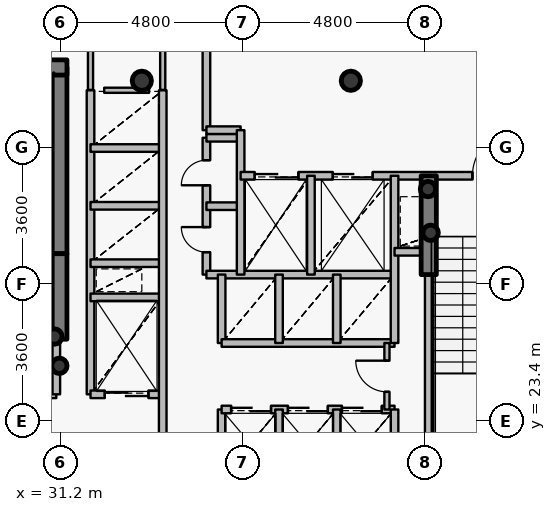
"""IFC4 building model, lengths in metres.
Left out: names, types, materials, properties, quantities, classifications, styles, units other than length and angle.
Written with IfcOpenShell. Run it as: python <this file> out.ifc"""

import sys

from ifc_helpers import new_model, si_unit, direction, frame, frame_2d, origin, origin_2d, place, context, subcontext, project, spatial, rectangle, hollow_circle, extrude, source, transform, mapped, element, fill, save


model = new_model("IFC4")
c1 = context("Model", 3, precision=1e-05, world=origin(), true_north=direction((0.0, 1.0)))
c2 = subcontext(c1, "Body", "Model", "MODEL_VIEW")
j1 = project(units=[si_unit("LENGTHUNIT", "METRE"), si_unit("PLANEANGLEUNIT", "RADIAN")], contexts=[c1])
p1 = place(None, origin())
s1 = spatial("IfcSite", under=j1, at=p1, CompositionType="ELEMENT")
p2 = place(p1, origin())
s2 = spatial("IfcBuilding", under=s1, at=p2, CompositionType="ELEMENT")
p3 = place(p2, frame((0.0, 0.0, 138.45)))
s3 = spatial("IfcBuildingStorey", under=s2, at=p3, CompositionType="ELEMENT", Elevation=138.45)
for number, where, z_axis, x_axis in (
    (1, (38.85, 32.35, 0.0), (0.0, 0.0, 1.0), (1.0, 0.0, 0.0)),
    (2, (33.35, 32.35, 0.0), (0.0, 0.0, 1.0), (1.0, 0.0, 0.0)),
):
    element("IfcColumn", number, at=place(p3, frame(where, z_axis=z_axis, x_axis=x_axis)), inside=s3, PredefinedType="COLUMN", context=c2, shape_type="SweptSolid", body=[
        extrude(hollow_circle(Radius=0.254, WallThickness=0.02, at=origin_2d()), origin(), (0.0, 0.0, 1.0), 3.75),
    ])
p4 = place(p3, frame((31.18, 27.8, 0.0), z_axis=(0.0, 0.0, 1.0), x_axis=(0.0, 1.0, 0.0)))
e3 = element("IfcWall", 3, at=p4, inside=s3, PredefinedType="SHEAR", context=c2, shape_type="SweptSolid", body=[
    extrude(rectangle(XDim=4.9, YDim=0.4, at=frame_2d((2.45, 0.0))), origin(), (0.0, 0.0, 1.0), 3.75),
])
p5 = place(p3, frame((27.28, 32.7, 0.0), z_axis=(0.0, 0.0, 1.0), x_axis=(1.0, 0.0, 0.0)))
e4 = element("IfcWall", 4, at=p5, inside=s3, PredefinedType="SHEAR", context=c2, shape_type="SweptSolid", body=[
    extrude(rectangle(XDim=4.1, YDim=0.4, at=frame_2d((2.05, 0.0))), origin(), (0.0, 0.0, 1.0), 3.75),
])
for number, where, z_axis, x_axis in (
    (5, (31.05, 25.62, 0.0), (0.0, 0.0, 1.0), (1.0, 0.0, 0.0)),
    (6, (31.18, 24.85, 0.0), (0.0, 0.0, 1.0), (1.0, 0.0, 0.0)),
    (7, (40.95, 28.35, 0.0), (0.0, 0.0, 1.0), (1.0, 0.0, 0.0)),
    (8, (40.88, 29.5, 0.0), (0.0, 0.0, 1.0), (1.0, 0.0, 0.0)),
):
    element("IfcColumn", number, at=place(p3, frame(where, z_axis=z_axis, x_axis=x_axis)), inside=s3, PredefinedType="COLUMN", context=c2, shape_type="SweptSolid", body=[
        extrude(hollow_circle(Radius=0.203, WallThickness=0.016, at=origin_2d()), origin(), (0.0, 0.0, 1.0), 3.75),
    ])
p6 = place(p3, frame((31.18, 25.55, 0.0), z_axis=(0.0, 0.0, 1.0), x_axis=(0.0, 1.0, 0.0)))
e9 = element("IfcWall", 9, at=p6, inside=s3, PredefinedType="SHEAR", context=c2, shape_type="SweptSolid", body=[
    extrude(rectangle(XDim=2.25, YDim=0.4, at=frame_2d((1.125, 0.0))), origin(), (0.0, 0.0, 1.0), 3.1),
])
p7 = place(p3, frame((40.9, 27.25, 0.0), z_axis=(0.0, 0.0, 1.0), x_axis=(0.0, 1.0, 0.0)))
e10 = element("IfcWall", 10, at=p7, inside=s3, PredefinedType="SHEAR", context=c2, shape_type="SweptSolid", body=[
    extrude(rectangle(XDim=2.6, YDim=0.4, at=frame_2d((1.3, 0.0))), origin(), (0.0, 0.0, 1.0), 3.1),
])
p8 = place(p3, frame((27.56, 24.1, 0.0), z_axis=(0.0, 0.0, 1.0), x_axis=(1.0, 0.0, 0.0)))
e11 = element("IfcWall", 11, at=p8, inside=s3, PredefinedType="PARTITIONING", context=c2, shape_type="SweptSolid", body=[
    extrude(rectangle(XDim=3.54, YDim=0.2, at=frame_2d((1.77, 0.0))), origin(), (0.0, 0.0, 1.0), 3.5),
])
p9 = place(p8, frame((1.17, 0.0, 0.0)))
e12 = element("IfcOpeningElement", 12, at=p9, cuts=e11, PredefinedType="OPENING", context=c2, shape_type="SweptSolid", body=[
    extrude(rectangle(XDim=1.2, YDim=2.15, at=origin_2d()), frame((0.6, 0.11, 1.075), z_axis=(0.0, -1.0, 0.0), x_axis=(1.0, 0.0, 0.0)), (0.0, 0.0, 1.0), 0.22),
])
p10 = place(p3, frame((31.1, 24.1, 0.0), z_axis=(0.0, 0.0, 1.0), x_axis=(0.0, 1.0, 0.0)))
e13 = element("IfcWall", 13, at=p10, inside=s3, PredefinedType="PARTITIONING", context=c2, shape_type="SweptSolid", body=[
    extrude(rectangle(XDim=1.44, YDim=0.2, at=frame_2d((0.72, 0.0))), origin(), (0.0, 0.0, 1.0), 3.5),
])
p11 = place(p3, frame((32.0, 24.1, 0.0), z_axis=(0.0, 0.0, 1.0), x_axis=(0.0, 1.0, 0.0)))
e14 = element("IfcWall", 14, at=p11, inside=s3, PredefinedType="PARTITIONING", context=c2, shape_type="SweptSolid", body=[
    extrude(rectangle(XDim=8.0, YDim=0.2, at=frame_2d((4.0, 0.0))), origin(), (0.0, 0.0, 1.0), 3.5),
])
p12 = place(p3, frame((32.0, 24.1, 0.0), z_axis=(0.0, 0.0, 1.0), x_axis=(1.0, 0.0, 0.0)))
e15 = element("IfcWall", 15, at=p12, inside=s3, PredefinedType="PARTITIONING", context=c2, shape_type="SweptSolid", body=[
    extrude(rectangle(XDim=1.9, YDim=0.2, at=frame_2d((0.95, 0.0))), origin(), (0.0, 0.0, 1.0), 3.085),
])
p13 = place(p12, frame((0.375, 0.0, 0.0)))
e16 = element("IfcOpeningElement", 16, at=p13, cuts=e15, PredefinedType="OPENING", context=c2, shape_type="SweptSolid", body=[
    extrude(rectangle(XDim=1.15, YDim=2.15, at=origin_2d()), frame((0.575, 0.11, 1.075), z_axis=(0.0, -1.0, 0.0), x_axis=(1.0, 0.0, 0.0)), (0.0, 0.0, 1.0), 0.22),
])
for number, where, z_axis, x_axis in (
    (17, (32.0, 26.65, 0.0), (0.0, 0.0, 1.0), (1.0, 0.0, 0.0)),
    (18, (32.0, 27.55, 0.0), (0.0, 0.0, 1.0), (1.0, 0.0, 0.0)),
    (19, (32.0, 29.06, 0.0), (0.0, 0.0, 1.0), (1.0, 0.0, 0.0)),
    (20, (32.0, 30.58, 0.0), (0.0, 0.0, 1.0), (1.0, 0.0, 0.0)),
):
    element("IfcWall", number, at=place(p3, frame(where, z_axis=z_axis, x_axis=x_axis)), inside=s3, PredefinedType="PARTITIONING", context=c2, shape_type="SweptSolid", body=[
        extrude(rectangle(XDim=1.9, YDim=0.2, at=frame_2d((0.95, 0.0))), origin(), (0.0, 0.0, 1.0), 3.085),
    ])
p14 = place(p3, frame((33.9, 20.6, 0.0), z_axis=(0.0, 0.0, 1.0), x_axis=(0.0, 1.0, 0.0)))
e21 = element("IfcWall", 21, at=p14, inside=s3, PredefinedType="PARTITIONING", context=c2, shape_type="SweptSolid", body=[
    extrude(rectangle(XDim=11.5, YDim=0.2, at=frame_2d((5.75, 0.0))), origin(), (0.0, 0.0, 1.0), 3.085),
])
p15 = place(p3, frame((35.05, 27.25, 0.0), z_axis=(0.0, 0.0, 1.0), x_axis=(0.0, 1.0, 0.0)))
e22 = element("IfcWall", 22, at=p15, inside=s3, PredefinedType="PARTITIONING", context=c2, shape_type="SweptSolid", body=[
    extrude(rectangle(XDim=3.6, YDim=0.2, at=frame_2d((1.8, 0.0))), origin(), (0.0, 0.0, 1.0), 3.5),
])
p16 = place(p15, frame((0.59, 0.0, 0.0)))
e23 = element("IfcOpeningElement", 23, at=p16, cuts=e22, PredefinedType="OPENING", context=c2, shape_type="SweptSolid", body=[
    extrude(rectangle(XDim=0.66, YDim=2.05, at=origin_2d()), frame((0.33, 0.11, 1.025), z_axis=(0.0, -1.0, 0.0), x_axis=(1.0, 0.0, 0.0)), (0.0, 0.0, 1.0), 0.22),
])
p17 = place(p15, frame((2.35, 0.0, 0.0)))
e24 = element("IfcOpeningElement", 24, at=p17, cuts=e22, PredefinedType="OPENING", context=c2, shape_type="SweptSolid", body=[
    extrude(rectangle(XDim=0.66, YDim=2.05, at=origin_2d()), frame((0.33, 0.11, 1.025), z_axis=(0.0, -1.0, 0.0), x_axis=(1.0, 0.0, 0.0)), (0.0, 0.0, 1.0), 0.22),
])
p18 = place(p3, frame((35.05, 27.25, 0.0), z_axis=(0.0, 0.0, 1.0), x_axis=(1.0, 0.0, 0.0)))
e25 = element("IfcWall", 25, at=p18, inside=s3, PredefinedType="PARTITIONING", context=c2, shape_type="SweptSolid", body=[
    extrude(rectangle(XDim=4.95, YDim=0.2, at=frame_2d((2.475, 0.0))), origin(), (0.0, 0.0, 1.0), 3.085),
])
for number, where, z_axis, x_axis in (
    (26, (35.05, 29.05, 0.0), (0.0, 0.0, 1.0), (1.0, 0.0, 0.0)),
    (27, (35.05, 30.85, 0.0), (0.0, 0.0, 1.0), (1.0, 0.0, 0.0)),
):
    element("IfcWall", number, at=place(p3, frame(where, z_axis=z_axis, x_axis=x_axis)), inside=s3, PredefinedType="PARTITIONING", context=c2, shape_type="SweptSolid", body=[
        extrude(rectangle(XDim=0.9, YDim=0.2, at=frame_2d((0.45, 0.0))), origin(), (0.0, 0.0, 1.0), 3.5),
    ])
p19 = place(p3, frame((35.05, 31.05, 0.0), z_axis=(0.0, 0.0, 1.0), x_axis=(0.0, 1.0, 0.0)))
e28 = element("IfcWall", 28, at=p19, inside=s3, PredefinedType="PARTITIONING", context=c2, shape_type="SweptSolid", body=[
    extrude(rectangle(XDim=2.35, YDim=0.2, at=frame_2d((1.175, 0.0))), origin(), (0.0, 0.0, 1.0), 3.085),
])
p20 = place(p3, frame((35.05, 31.05, 0.0), z_axis=(0.0, 0.0, 1.0), x_axis=(1.0, 0.0, 0.0)))
e29 = element("IfcWall", 29, at=p20, inside=s3, PredefinedType="PARTITIONING", context=c2, shape_type="SweptSolid", body=[
    extrude(rectangle(XDim=0.9, YDim=0.2, at=frame_2d((0.45, 0.0))), origin(), (0.0, 0.0, 1.0), 3.5),
])
p21 = place(p3, frame((35.45, 21.9, 0.0), z_axis=(0.0, 0.0, 1.0), x_axis=(0.0, 1.0, 0.0)))
e30 = element("IfcWall", 30, at=p21, inside=s3, PredefinedType="PARTITIONING", context=c2, shape_type="SweptSolid", body=[
    extrude(rectangle(XDim=1.8, YDim=0.2, at=frame_2d((0.9, 0.0))), origin(), (0.0, 0.0, 1.0), 3.5),
])
p22 = place(p3, frame((35.45, 23.7, 0.0), z_axis=(0.0, 0.0, 1.0), x_axis=(1.0, 0.0, 0.0)))
e31 = element("IfcWall", 31, at=p22, inside=s3, PredefinedType="PARTITIONING", context=c2, shape_type="SweptSolid", body=[
    extrude(rectangle(XDim=4.55, YDim=0.2, at=frame_2d((2.275, 0.0))), origin(), (0.0, 0.0, 1.0), 3.085),
])
p23 = place(p22, frame((0.25, 0.0, 0.0)))
e32 = element("IfcOpeningElement", 32, at=p23, cuts=e31, PredefinedType="OPENING", context=c2, shape_type="SweptSolid", body=[
    extrude(rectangle(XDim=1.05, YDim=2.15, at=origin_2d()), frame((0.525, 0.11, 1.075), z_axis=(0.0, -1.0, 0.0), x_axis=(1.0, 0.0, 0.0)), (0.0, 0.0, 1.0), 0.22),
])
p24 = place(p22, frame((1.745, 0.0, 0.0)))
e33 = element("IfcOpeningElement", 33, at=p24, cuts=e31, PredefinedType="OPENING", context=c2, shape_type="SweptSolid", body=[
    extrude(rectangle(XDim=1.05, YDim=2.15, at=origin_2d()), frame((0.525, 0.11, 1.075), z_axis=(0.0, -1.0, 0.0), x_axis=(1.0, 0.0, 0.0)), (0.0, 0.0, 1.0), 0.22),
])
p25 = place(p22, frame((3.165, 0.0, 0.0)))
e34 = element("IfcOpeningElement", 34, at=p25, cuts=e31, PredefinedType="OPENING", context=c2, shape_type="SweptSolid", body=[
    extrude(rectangle(XDim=1.05, YDim=2.15, at=origin_2d()), frame((0.525, 0.11, 1.075), z_axis=(0.0, -1.0, 0.0), x_axis=(1.0, 0.0, 0.0)), (0.0, 0.0, 1.0), 0.22),
])
p26 = place(p3, frame((35.45, 25.45, 0.0), z_axis=(0.0, 0.0, 1.0), x_axis=(0.0, 1.0, 0.0)))
e35 = element("IfcWall", 35, at=p26, inside=s3, PredefinedType="PARTITIONING", context=c2, shape_type="SweptSolid", body=[
    extrude(rectangle(XDim=1.8, YDim=0.2, at=frame_2d((0.9, 0.0))), origin(), (0.0, 0.0, 1.0), 3.5),
])
p27 = place(p3, frame((35.45, 25.45, 0.0), z_axis=(0.0, 0.0, 1.0), x_axis=(1.0, 0.0, 0.0)))
e36 = element("IfcWall", 36, at=p27, inside=s3, PredefinedType="PARTITIONING", context=c2, shape_type="SweptSolid", body=[
    extrude(rectangle(XDim=4.55, YDim=0.2, at=frame_2d((2.275, 0.0))), origin(), (0.0, 0.0, 1.0), 3.085),
])
p28 = place(p3, frame((35.95, 27.25, 0.0), z_axis=(0.0, 0.0, 1.0), x_axis=(0.0, 1.0, 0.0)))
e37 = element("IfcWall", 37, at=p28, inside=s3, PredefinedType="PARTITIONING", context=c2, shape_type="SweptSolid", body=[
    extrude(rectangle(XDim=3.8, YDim=0.2, at=frame_2d((1.9, 0.0))), origin(), (0.0, 0.0, 1.0), 3.5),
])
p29 = place(p3, frame((35.95, 29.85, 0.0), z_axis=(0.0, 0.0, 1.0), x_axis=(1.0, 0.0, 0.0)))
e38 = element("IfcWall", 38, at=p29, inside=s3, PredefinedType="PARTITIONING", context=c2, shape_type="SweptSolid", body=[
    extrude(rectangle(XDim=8.49, YDim=0.2, at=frame_2d((4.245, 0.0))), origin(), (0.0, 0.0, 1.0), 3.085),
])
p30 = place(p29, frame((6.1, 0.0, 0.0)))
e39 = element("IfcOpeningElement", 39, at=p30, cuts=e38, PredefinedType="OPENING", context=c2, shape_type="SweptSolid", body=[
    extrude(rectangle(XDim=1.2, YDim=2.15, at=origin_2d()), frame((0.6, 0.11, 1.075), z_axis=(0.0, -1.0, 0.0), x_axis=(1.0, 0.0, 0.0)), (0.0, 0.0, 1.0), 0.22),
])
p31 = place(p29, frame((0.37, 0.0, 0.0)))
e40 = element("IfcOpeningElement", 40, at=p31, cuts=e38, PredefinedType="OPENING", context=c2, shape_type="SweptSolid", body=[
    extrude(rectangle(XDim=1.15, YDim=2.15, at=origin_2d()), frame((0.575, 0.11, 1.075), z_axis=(0.0, -1.0, 0.0), x_axis=(1.0, 0.0, 0.0)), (0.0, 0.0, 1.0), 0.22),
])
p32 = place(p29, frame((2.425, 0.0, 0.0)))
e41 = element("IfcOpeningElement", 41, at=p32, cuts=e38, PredefinedType="OPENING", context=c2, shape_type="SweptSolid", body=[
    extrude(rectangle(XDim=1.05, YDim=2.15, at=origin_2d()), frame((0.525, 0.11, 1.075), z_axis=(0.0, -1.0, 0.0), x_axis=(1.0, 0.0, 0.0)), (0.0, 0.0, 1.0), 0.22),
])
for number, where, z_axis, x_axis in (
    (42, (36.96, 21.9, 0.0), (0.0, 0.0, 1.0), (0.0, 1.0, 0.0)),
    (43, (36.96, 25.45, 0.0), (0.0, 0.0, 1.0), (0.0, 1.0, 0.0)),
):
    element("IfcWall", number, at=place(p3, frame(where, z_axis=z_axis, x_axis=x_axis)), inside=s3, PredefinedType="PARTITIONING", context=c2, shape_type="SweptSolid", body=[
        extrude(rectangle(XDim=1.8, YDim=0.2, at=frame_2d((0.9, 0.0))), origin(), (0.0, 0.0, 1.0), 3.5),
    ])
p33 = place(p3, frame((37.8, 27.25, 0.0), z_axis=(0.0, 0.0, 1.0), x_axis=(0.0, 1.0, 0.0)))
e44 = element("IfcWall", 44, at=p33, inside=s3, PredefinedType="PARTITIONING", context=c2, shape_type="SweptSolid", body=[
    extrude(rectangle(XDim=2.6, YDim=0.2, at=frame_2d((1.3, 0.0))), origin(), (0.0, 0.0, 1.0), 3.5),
])
for number, where, z_axis, x_axis in (
    (45, (38.48, 21.9, 0.0), (0.0, 0.0, 1.0), (0.0, 1.0, 0.0)),
    (46, (38.48, 25.45, 0.0), (0.0, 0.0, 1.0), (0.0, 1.0, 0.0)),
):
    element("IfcWall", number, at=place(p3, frame(where, z_axis=z_axis, x_axis=x_axis)), inside=s3, PredefinedType="PARTITIONING", context=c2, shape_type="SweptSolid", body=[
        extrude(rectangle(XDim=1.8, YDim=0.2, at=frame_2d((0.9, 0.0))), origin(), (0.0, 0.0, 1.0), 3.5),
    ])
p34 = place(p3, frame((39.8, 23.7, 0.0), z_axis=(0.0, 0.0, 1.0), x_axis=(0.0, 1.0, 0.0)))
e47 = element("IfcWall", 47, at=p34, inside=s3, PredefinedType="PARTITIONING", context=c2, shape_type="SweptSolid", body=[
    extrude(rectangle(XDim=1.75, YDim=0.135, at=frame_2d((0.875, 0.0))), origin(), (0.0, 0.0, 1.0), 3.5),
])
p35 = place(p34, frame((0.465, 0.0, 0.0)))
e48 = element("IfcOpeningElement", 48, at=p35, cuts=e47, PredefinedType="OPENING", context=c2, shape_type="SweptSolid", body=[
    extrude(rectangle(XDim=0.82, YDim=2.1, at=origin_2d()), frame((0.41, 0.078, 1.05), z_axis=(0.0, -1.0, 0.0), x_axis=(1.0, 0.0, 0.0)), (0.0, 0.0, 1.0), 0.155),
])
p36 = place(p3, frame((40.0, 21.9, 0.0), z_axis=(0.0, 0.0, 1.0), x_axis=(0.0, 1.0, 0.0)))
e49 = element("IfcWall", 49, at=p36, inside=s3, PredefinedType="PARTITIONING", context=c2, shape_type="SweptSolid", body=[
    extrude(rectangle(XDim=1.8, YDim=0.2, at=frame_2d((0.9, 0.0))), origin(), (0.0, 0.0, 1.0), 3.5),
])
p37 = place(p3, frame((40.0, 25.45, 0.0), z_axis=(0.0, 0.0, 1.0), x_axis=(0.0, 1.0, 0.0)))
e50 = element("IfcWall", 50, at=p37, inside=s3, PredefinedType="PARTITIONING", context=c2, shape_type="SweptSolid", body=[
    extrude(rectangle(XDim=4.4, YDim=0.2, at=frame_2d((2.2, 0.0))), origin(), (0.0, 0.0, 1.0), 3.5),
])
p38 = place(p3, frame((40.0, 27.85, 0.0), z_axis=(0.0, 0.0, 1.0), x_axis=(1.0, 0.0, 0.0)))
e51 = element("IfcWall", 51, at=p38, inside=s3, PredefinedType="PARTITIONING", context=c2, shape_type="SweptSolid", body=[
    extrude(rectangle(XDim=0.9, YDim=0.2, at=frame_2d((0.45, 0.0))), origin(), (0.0, 0.0, 1.0), 3.5),
])
p39 = place(p3, frame((40.9, 21.33, 0.0), z_axis=(0.0, 0.0, 1.0), x_axis=(0.0, 1.0, 0.0)))
e52 = element("IfcWall", 52, at=p39, inside=s3, PredefinedType="PARTITIONING", context=c2, shape_type="SweptSolid", body=[
    extrude(rectangle(XDim=5.91, YDim=0.2, at=frame_2d((2.955, 0.0))), origin(), (0.0, 0.0, 1.0), 3.035),
])
p40 = place(p3, frame((32.36, 32.1, 0.0), z_axis=(0.0, 0.0, 1.0), x_axis=(1.0, 0.0, 0.0)))
e53 = element("IfcWall", 53, at=p40, inside=s3, PredefinedType="PARTITIONING", context=c2, shape_type="SweptSolid", body=[
    extrude(rectangle(XDim=1.18, YDim=0.135, at=frame_2d((0.59, 0.0))), origin(), (0.0, 0.0, 1.0), 3.085),
])
p41 = place(p3, frame((32.0, 33.14, 0.0), z_axis=(0.0, 0.0, 1.0), x_axis=(0.0, -1.0, 0.0)))
e54 = element("IfcWall", 54, at=p41, inside=s3, PredefinedType="PARTITIONING", context=c2, shape_type="SweptSolid", body=[
    extrude(rectangle(XDim=1.03, YDim=0.135, at=frame_2d((0.515, 0.0))), origin(), (0.0, 0.0, 1.0), 3.035),
])
p42 = place(p3, frame((33.9, 32.11, 0.0), z_axis=(0.0, 0.0, 1.0), x_axis=(0.0, 1.0, 0.0)))
e55 = element("IfcWall", 55, at=p42, inside=s3, PredefinedType="PARTITIONING", context=c2, shape_type="SweptSolid", body=[
    extrude(rectangle(XDim=1.03, YDim=0.135, at=frame_2d((0.515, 0.0))), origin(), (0.0, 0.0, 1.0), 3.085),
])
m1 = source(origin(), c2, "Body", "SweptSolid", [
    extrude(rectangle(XDim=1.2, YDim=2.15, at=origin_2d()), frame((0.6, 0.025, 1.075), z_axis=(0.0, -1.0, 0.0), x_axis=(1.0, 0.0, 0.0)), (0.0, 0.0, 1.0), 0.05),
])
p43 = place(p30, origin())
e56 = element("IfcDoor", 56, at=p43, inside=s3, OperationType="SINGLE_SWING_RIGHT", PredefinedType="DOOR", context=c2, shape_type="MappedRepresentation", body=[
    mapped(m1, transform((0.0, 0.0, 0.0), x_axis=(1.0, 0.0, 0.0), y_axis=(0.0, 1.0, 0.0), z_axis=(0.0, 0.0, 1.0), scale=1.0)),
])
fill(e39, e56)
m2 = source(origin(), c2, "Body", "SweptSolid", [
    extrude(rectangle(XDim=1.15, YDim=2.15, at=origin_2d()), frame((0.575, 0.025, 1.075), z_axis=(0.0, -1.0, 0.0), x_axis=(1.0, 0.0, 0.0)), (0.0, 0.0, 1.0), 0.05),
])
p44 = place(p31, origin())
e57 = element("IfcDoor", 57, at=p44, inside=s3, OperationType="DOUBLE_DOOR_SLIDING", PredefinedType="USERDEFINED", context=c2, shape_type="MappedRepresentation", body=[
    mapped(m2, transform((0.0, 0.0, 0.0), x_axis=(1.0, 0.0, 0.0), y_axis=(0.0, 1.0, 0.0), z_axis=(0.0, 0.0, 1.0), scale=1.0)),
])
fill(e40, e57)
p45 = place(p13, origin())
e58 = element("IfcDoor", 58, at=p45, inside=s3, OperationType="DOUBLE_DOOR_SLIDING", PredefinedType="USERDEFINED", context=c2, shape_type="MappedRepresentation", body=[
    mapped(m2, transform((0.0, 0.0, 0.0), x_axis=(1.0, 0.0, 0.0), y_axis=(0.0, 1.0, 0.0), z_axis=(0.0, 0.0, 1.0), scale=1.0)),
])
fill(e16, e58)
m3 = source(origin(), c2, "Body", "SweptSolid", [
    extrude(rectangle(XDim=1.05, YDim=2.15, at=origin_2d()), frame((0.525, 0.025, 1.075), z_axis=(0.0, -1.0, 0.0), x_axis=(1.0, 0.0, 0.0)), (0.0, 0.0, 1.0), 0.05),
])
p46 = place(p32, origin())
e59 = element("IfcDoor", 59, at=p46, inside=s3, OperationType="DOUBLE_DOOR_SLIDING", PredefinedType="USERDEFINED", context=c2, shape_type="MappedRepresentation", body=[
    mapped(m3, transform((0.0, 0.0, 0.0), x_axis=(1.0, 0.0, 0.0), y_axis=(0.0, 1.0, 0.0), z_axis=(0.0, 0.0, 1.0), scale=1.0)),
])
fill(e41, e59)
p47 = place(p23, origin())
e60 = element("IfcDoor", 60, at=p47, inside=s3, OperationType="DOUBLE_DOOR_SLIDING", PredefinedType="USERDEFINED", context=c2, shape_type="MappedRepresentation", body=[
    mapped(m3, transform((0.0, 0.0, 0.0), x_axis=(1.0, 0.0, 0.0), y_axis=(0.0, 1.0, 0.0), z_axis=(0.0, 0.0, 1.0), scale=1.0)),
])
fill(e32, e60)
p48 = place(p24, origin())
e61 = element("IfcDoor", 61, at=p48, inside=s3, OperationType="DOUBLE_DOOR_SLIDING", PredefinedType="USERDEFINED", context=c2, shape_type="MappedRepresentation", body=[
    mapped(m3, transform((0.0, 0.0, 0.0), x_axis=(1.0, 0.0, 0.0), y_axis=(0.0, 1.0, 0.0), z_axis=(0.0, 0.0, 1.0), scale=1.0)),
])
fill(e33, e61)
p49 = place(p25, origin())
e62 = element("IfcDoor", 62, at=p49, inside=s3, OperationType="DOUBLE_DOOR_SLIDING", PredefinedType="USERDEFINED", context=c2, shape_type="MappedRepresentation", body=[
    mapped(m3, transform((0.0, 0.0, 0.0), x_axis=(1.0, 0.0, 0.0), y_axis=(0.0, 1.0, 0.0), z_axis=(0.0, 0.0, 1.0), scale=1.0)),
])
fill(e34, e62)
m4 = source(origin(), c2, "Body", "SweptSolid", [
    extrude(rectangle(XDim=0.66, YDim=2.05, at=origin_2d()), frame((0.33, 0.025, 1.025), z_axis=(0.0, -1.0, 0.0), x_axis=(1.0, 0.0, 0.0)), (0.0, 0.0, 1.0), 0.05),
])
p50 = place(p16, origin())
e63 = element("IfcDoor", 63, at=p50, inside=s3, OperationType="SINGLE_SWING_RIGHT", PredefinedType="USERDEFINED", context=c2, shape_type="MappedRepresentation", body=[
    mapped(m4, transform((0.0, 0.0, 0.0), x_axis=(1.0, 0.0, 0.0), y_axis=(0.0, 1.0, 0.0), z_axis=(0.0, 0.0, 1.0), scale=1.0)),
])
fill(e23, e63)
p51 = place(p17, origin())
e64 = element("IfcDoor", 64, at=p51, inside=s3, OperationType="SINGLE_SWING_LEFT", PredefinedType="USERDEFINED", context=c2, shape_type="MappedRepresentation", body=[
    mapped(m4, transform((0.0, 0.0, 0.0), x_axis=(1.0, 0.0, 0.0), y_axis=(0.0, 1.0, 0.0), z_axis=(0.0, 0.0, 1.0), scale=1.0)),
])
fill(e24, e64)
m5 = source(origin(), c2, "Body", "SweptSolid", [
    extrude(rectangle(XDim=0.82, YDim=2.1, at=origin_2d()), frame((0.41, 0.025, 1.05), z_axis=(0.0, -1.0, 0.0), x_axis=(1.0, 0.0, 0.0)), (0.0, 0.0, 1.0), 0.05),
])
p52 = place(p35, origin())
e65 = element("IfcDoor", 65, at=p52, inside=s3, OperationType="SINGLE_SWING_RIGHT", PredefinedType="DOOR", context=c2, shape_type="MappedRepresentation", body=[
    mapped(m5, transform((0.0, 0.0, 0.0), x_axis=(1.0, 0.0, 0.0), y_axis=(0.0, 1.0, 0.0), z_axis=(0.0, 0.0, 1.0), scale=1.0)),
])
fill(e48, e65)
save(model, sys.argv[1])
